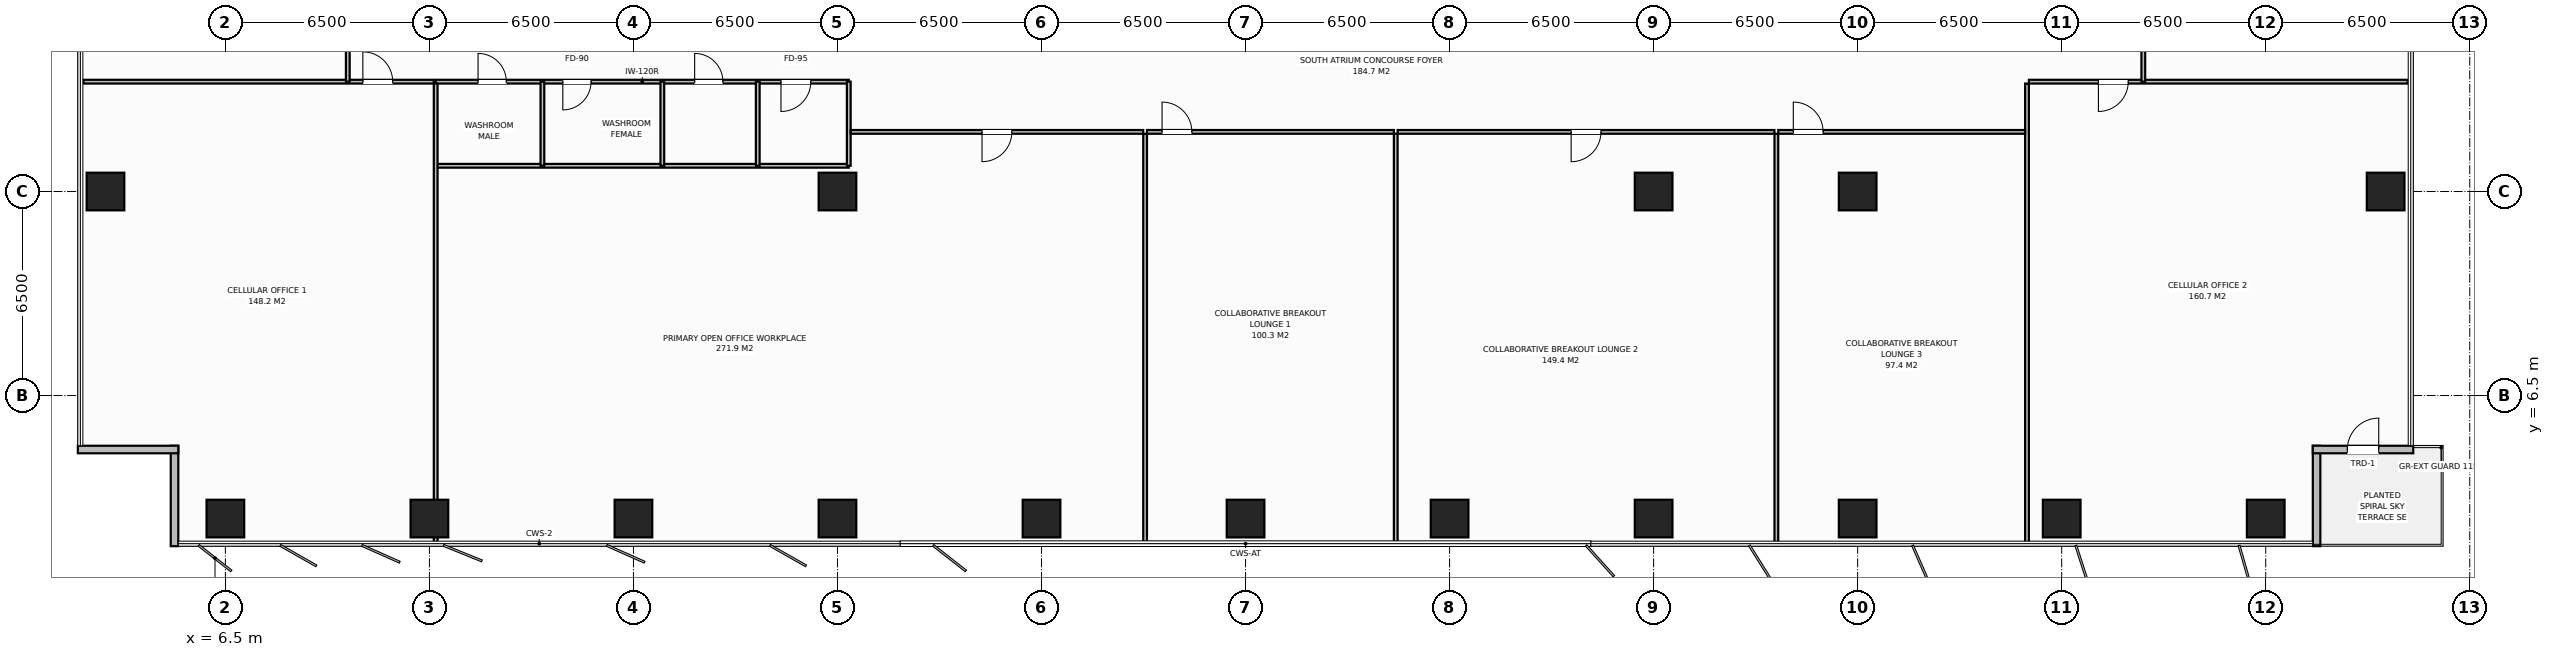
"""IFC4 building model, lengths in metres.
Left out: names, types, materials, properties, quantities, classifications, styles, units other than length and angle.
Written with IfcOpenShell. Run it as: python <this file> out.ifc"""

import sys

from ifc_helpers import new_model, si_unit, direction, frame, frame_2d, origin, origin_2d, place, context, subcontext, project, spatial, rectangle, extrude, element, fill, save


model = new_model("IFC4")
c1 = context("Model", 3, precision=1e-05, world=origin(), true_north=direction((0.0, 1.0)))
c2 = subcontext(c1, "Body", "Model", "MODEL_VIEW")
j1 = project(units=[si_unit("LENGTHUNIT", "METRE"), si_unit("PLANEANGLEUNIT", "RADIAN")], contexts=[c1])
p1 = place(None, origin())
s1 = spatial("IfcSite", under=j1, at=p1, CompositionType="ELEMENT")
p2 = place(p1, origin())
s2 = spatial("IfcBuilding", under=s1, at=p2, CompositionType="ELEMENT")
p3 = place(p2, frame((0.0, 0.0, 116.4)))
s3 = spatial("IfcBuildingStorey", under=s2, at=p3, CompositionType="ELEMENT", Elevation=116.4)
for number, where, z_axis, x_axis in (
    (1, (58.5, 13.0, 0.0), (0.0, 0.0, 1.0), (1.0, 0.0, 0.0)),
    (2, (26.0, 13.0, 0.0), (0.0, 0.0, 1.0), (1.0, 0.0, 0.0)),
    (3, (52.0, 13.0, 0.0), (0.0, 0.0, 1.0), (1.0, 0.0, 0.0)),
    (4, (6.5, 2.58, 0.0), (0.0, 0.0, 1.0), (1.0, 0.0, 0.0)),
    (5, (13.0, 2.58, 0.0), (0.0, 0.0, 1.0), (1.0, 0.0, 0.0)),
    (6, (19.5, 2.58, 0.0), (0.0, 0.0, 1.0), (1.0, 0.0, 0.0)),
    (7, (26.0, 2.58, 0.0), (0.0, 0.0, 1.0), (1.0, 0.0, 0.0)),
    (8, (32.5, 2.58, 0.0), (0.0, 0.0, 1.0), (1.0, 0.0, 0.0)),
    (9, (39.0, 2.58, 0.0), (0.0, 0.0, 1.0), (1.0, 0.0, 0.0)),
    (10, (45.5, 2.58, 0.0), (0.0, 0.0, 1.0), (1.0, 0.0, 0.0)),
    (11, (52.0, 2.58, 0.0), (0.0, 0.0, 1.0), (1.0, 0.0, 0.0)),
    (12, (58.5, 2.58, 0.0), (0.0, 0.0, 1.0), (1.0, 0.0, 0.0)),
    (13, (65.0, 2.58, 0.0), (0.0, 0.0, 1.0), (1.0, 0.0, 0.0)),
    (14, (71.5, 2.58, 0.0), (0.0, 0.0, 1.0), (1.0, 0.0, 0.0)),
    (15, (2.68, 13.0, 0.0), (0.0, 0.0, 1.0), (1.0, 0.0, 0.0)),
    (16, (75.32, 13.0, 0.0), (0.0, 0.0, 1.0), (1.0, 0.0, 0.0)),
):
    element("IfcColumn", number, at=place(p3, frame(where, z_axis=z_axis, x_axis=x_axis)), inside=s3, PredefinedType="COLUMN", context=c2, shape_type="SweptSolid", body=[
        extrude(rectangle(XDim=1.2, YDim=1.2, at=origin_2d()), origin(), (0.0, 0.0, 1.0), 3.8),
    ])
for number, where, z_axis, x_axis in (
    (17, (4.88, 1.7, 0.0), (0.0, 0.0, 1.0), (0.0, 1.0, 0.0)),
    (18, (5.0, 4.78, 0.0), (0.0, 0.0, 1.0), (-1.0, 0.0, 0.0)),
    (19, (73.12, 4.9, 0.0), (0.0, 0.0, 1.0), (0.0, -1.0, 0.0)),
):
    element("IfcWall", number, at=place(p3, frame(where, z_axis=z_axis, x_axis=x_axis)), inside=s3, PredefinedType="STANDARD", context=c2, shape_type="SweptSolid", body=[
        extrude(rectangle(XDim=3.2, YDim=0.24, at=frame_2d((1.6, 0.0))), origin(), (0.0, 0.0, 1.0), 3.565),
    ])
p4 = place(p3, frame((76.2, 4.78, 0.0), z_axis=(0.0, 0.0, 1.0), x_axis=(-1.0, 0.0, 0.0)))
e20 = element("IfcWall", 20, at=p4, inside=s3, PredefinedType="STANDARD", context=c2, shape_type="SweptSolid", body=[
    extrude(rectangle(XDim=3.2, YDim=0.24, at=frame_2d((1.6, 0.0))), origin(), (0.0, 0.0, 1.0), 3.565),
])
p5 = place(p4, frame((1.1, 0.0, 0.0)))
e21 = element("IfcOpeningElement", 21, at=p5, cuts=e20, PredefinedType="OPENING", context=c2, shape_type="SweptSolid", body=[
    extrude(rectangle(XDim=1.0, YDim=2.2, at=frame_2d((0.5, 1.1))), frame((0.0, 0.13, 0.0), z_axis=(0.0, -1.0, 0.0), x_axis=(1.0, 0.0, 0.0)), (0.0, 0.0, 1.0), 0.26),
])
p6 = place(p3, frame((13.2, 16.5, 0.0), z_axis=(0.0, 0.0, 1.0), x_axis=(1.0, 0.0, 0.0)))
e22 = element("IfcWall", 22, at=p6, inside=s3, PredefinedType="PARTITIONING", context=c2, shape_type="SweptSolid", body=[
    extrude(rectangle(XDim=13.16, YDim=0.12, at=frame_2d((6.58, 0.0))), origin(), (0.0, 0.0, 1.0), 3.565),
])
p7 = place(p6, frame((1.35, 0.0, 0.0)))
e23 = element("IfcOpeningElement", 23, at=p7, cuts=e22, PredefinedType="OPENING", context=c2, shape_type="SweptSolid", body=[
    extrude(rectangle(XDim=0.9, YDim=2.15, at=frame_2d((0.45, 1.075))), frame((0.0, 0.07, 0.0), z_axis=(0.0, -1.0, 0.0), x_axis=(1.0, 0.0, 0.0)), (0.0, 0.0, 1.0), 0.14),
])
p8 = place(p6, frame((4.05, 0.0, 0.0)))
e24 = element("IfcOpeningElement", 24, at=p8, cuts=e22, PredefinedType="OPENING", context=c2, shape_type="SweptSolid", body=[
    extrude(rectangle(XDim=0.9, YDim=2.15, at=frame_2d((0.45, 1.075))), frame((0.0, 0.07, 0.0), z_axis=(0.0, -1.0, 0.0), x_axis=(1.0, 0.0, 0.0)), (0.0, 0.0, 1.0), 0.14),
])
p9 = place(p6, frame((8.25, 0.0, 0.0)))
e25 = element("IfcOpeningElement", 25, at=p9, cuts=e22, PredefinedType="OPENING", context=c2, shape_type="SweptSolid", body=[
    extrude(rectangle(XDim=0.9, YDim=2.15, at=frame_2d((0.45, 1.075))), frame((0.0, 0.07, 0.0), z_axis=(0.0, -1.0, 0.0), x_axis=(1.0, 0.0, 0.0)), (0.0, 0.0, 1.0), 0.14),
])
p10 = place(p6, frame((11.0, 0.0, 0.0)))
e26 = element("IfcOpeningElement", 26, at=p10, cuts=e22, PredefinedType="OPENING", context=c2, shape_type="SweptSolid", body=[
    extrude(rectangle(XDim=0.95, YDim=2.15, at=frame_2d((0.475, 1.075))), frame((0.0, 0.07, 0.0), z_axis=(0.0, -1.0, 0.0), x_axis=(1.0, 0.0, 0.0)), (0.0, 0.0, 1.0), 0.14),
])
p11 = place(p3, frame((13.2, 13.82, 0.0), z_axis=(0.0, 0.0, 1.0), x_axis=(1.0, 0.0, 0.0)))
e27 = element("IfcWall", 27, at=p11, inside=s3, PredefinedType="PARTITIONING", context=c2, shape_type="SweptSolid", body=[
    extrude(rectangle(XDim=13.16, YDim=0.12, at=frame_2d((6.58, 0.0))), origin(), (0.0, 0.0, 1.0), 3.565),
])
for number, where, z_axis, x_axis in (
    (28, (16.6, 13.82, 0.0), (0.0, 0.0, 1.0), (0.0, 1.0, 0.0)),
    (29, (20.42, 13.82, 0.0), (0.0, 0.0, 1.0), (0.0, 1.0, 0.0)),
    (30, (23.46, 13.82, 0.0), (0.0, 0.0, 1.0), (0.0, 1.0, 0.0)),
    (31, (26.36, 13.82, 0.0), (0.0, 0.0, 1.0), (0.0, 1.0, 0.0)),
):
    element("IfcWall", number, at=place(p3, frame(where, z_axis=z_axis, x_axis=x_axis)), inside=s3, PredefinedType="PARTITIONING", context=c2, shape_type="SweptSolid", body=[
        extrude(rectangle(XDim=2.68, YDim=0.12, at=frame_2d((1.34, 0.0))), origin(), (0.0, 0.0, 1.0), 3.565),
    ])
p12 = place(p3, frame((13.2, 1.72, 0.0), z_axis=(0.0, 0.0, 1.0), x_axis=(0.0, 1.0, 0.0)))
e32 = element("IfcWall", 32, at=p12, inside=s3, PredefinedType="PARTITIONING", context=c2, shape_type="SweptSolid", body=[
    extrude(rectangle(XDim=14.72, YDim=0.12, at=frame_2d((7.36, 0.0))), origin(), (0.0, 0.0, 1.0), 2.965),
])
p13 = place(p3, frame((1.98, 16.5, 0.0), z_axis=(0.0, 0.0, 1.0), x_axis=(1.0, 0.0, 0.0)))
e33 = element("IfcWall", 33, at=p13, inside=s3, PredefinedType="PARTITIONING", context=c2, shape_type="SweptSolid", body=[
    extrude(rectangle(XDim=11.16, YDim=0.12, at=frame_2d((5.58, 0.0))), origin(), (0.0, 0.0, 1.0), 3.565),
])
p14 = place(p13, frame((8.9, 0.0, 0.0)))
e34 = element("IfcOpeningElement", 34, at=p14, cuts=e33, PredefinedType="OPENING", context=c2, shape_type="SweptSolid", body=[
    extrude(rectangle(XDim=0.95, YDim=2.15, at=frame_2d((0.475, 1.075))), frame((0.0, 0.07, 0.0), z_axis=(0.0, -1.0, 0.0), x_axis=(1.0, 0.0, 0.0)), (0.0, 0.0, 1.0), 0.14),
])
p15 = place(p3, frame((35.8, 1.72, 0.0), z_axis=(0.0, 0.0, 1.0), x_axis=(0.0, 1.0, 0.0)))
e35 = element("IfcWall", 35, at=p15, inside=s3, PredefinedType="PARTITIONING", context=c2, shape_type="SweptSolid", body=[
    extrude(rectangle(XDim=13.12, YDim=0.12, at=frame_2d((6.56, 0.0))), origin(), (0.0, 0.0, 1.0), 3.565),
])
p16 = place(p3, frame((26.42, 14.9, 0.0), z_axis=(0.0, 0.0, 1.0), x_axis=(1.0, 0.0, 0.0)))
e36 = element("IfcWall", 36, at=p16, inside=s3, PredefinedType="PARTITIONING", context=c2, shape_type="SweptSolid", body=[
    extrude(rectangle(XDim=9.32, YDim=0.12, at=frame_2d((4.66, 0.0))), origin(), (0.0, 0.0, 1.0), 3.565),
])
p17 = place(p16, frame((4.185, 0.0, 0.0)))
e37 = element("IfcOpeningElement", 37, at=p17, cuts=e36, PredefinedType="OPENING", context=c2, shape_type="SweptSolid", body=[
    extrude(rectangle(XDim=0.95, YDim=2.15, at=frame_2d((0.475, 1.075))), frame((0.0, 0.07, 0.0), z_axis=(0.0, -1.0, 0.0), x_axis=(1.0, 0.0, 0.0)), (0.0, 0.0, 1.0), 0.14),
])
p18 = place(p3, frame((43.785, 1.72, 0.0), z_axis=(0.0, 0.0, 1.0), x_axis=(0.0, 1.0, 0.0)))
e38 = element("IfcWall", 38, at=p18, inside=s3, PredefinedType="PARTITIONING", context=c2, shape_type="SweptSolid", body=[
    extrude(rectangle(XDim=13.12, YDim=0.12, at=frame_2d((6.56, 0.0))), origin(), (0.0, 0.0, 1.0), 3.565),
])
p19 = place(p3, frame((35.86, 14.9, 0.0), z_axis=(0.0, 0.0, 1.0), x_axis=(1.0, 0.0, 0.0)))
e39 = element("IfcWall", 39, at=p19, inside=s3, PredefinedType="PARTITIONING", context=c2, shape_type="SweptSolid", body=[
    extrude(rectangle(XDim=7.865, YDim=0.12, at=frame_2d((3.932, 0.0))), origin(), (0.0, 0.0, 1.0), 3.565),
])
p20 = place(p19, frame((0.48, 0.0, 0.0)))
e40 = element("IfcOpeningElement", 40, at=p20, cuts=e39, PredefinedType="OPENING", context=c2, shape_type="SweptSolid", body=[
    extrude(rectangle(XDim=0.95, YDim=2.15, at=frame_2d((0.475, 1.075))), frame((0.0, 0.07, 0.0), z_axis=(0.0, -1.0, 0.0), x_axis=(1.0, 0.0, 0.0)), (0.0, 0.0, 1.0), 0.14),
])
p21 = place(p3, frame((55.91, 1.72, 0.0), z_axis=(0.0, 0.0, 1.0), x_axis=(0.0, 1.0, 0.0)))
e41 = element("IfcWall", 41, at=p21, inside=s3, PredefinedType="PARTITIONING", context=c2, shape_type="SweptSolid", body=[
    extrude(rectangle(XDim=13.12, YDim=0.12, at=frame_2d((6.56, 0.0))), origin(), (0.0, 0.0, 1.0), 3.565),
])
p22 = place(p3, frame((43.845, 14.9, 0.0), z_axis=(0.0, 0.0, 1.0), x_axis=(1.0, 0.0, 0.0)))
e42 = element("IfcWall", 42, at=p22, inside=s3, PredefinedType="PARTITIONING", context=c2, shape_type="SweptSolid", body=[
    extrude(rectangle(XDim=12.005, YDim=0.12, at=frame_2d((6.002, 0.0))), origin(), (0.0, 0.0, 1.0), 3.565),
])
p23 = place(p22, frame((5.528, 0.0, 0.0)))
e43 = element("IfcOpeningElement", 43, at=p23, cuts=e42, PredefinedType="OPENING", context=c2, shape_type="SweptSolid", body=[
    extrude(rectangle(XDim=0.95, YDim=2.15, at=frame_2d((0.475, 1.075))), frame((0.0, 0.07, 0.0), z_axis=(0.0, -1.0, 0.0), x_axis=(1.0, 0.0, 0.0)), (0.0, 0.0, 1.0), 0.14),
])
p24 = place(p3, frame((63.895, 1.72, 0.0), z_axis=(0.0, 0.0, 1.0), x_axis=(0.0, 1.0, 0.0)))
e44 = element("IfcWall", 44, at=p24, inside=s3, PredefinedType="PARTITIONING", context=c2, shape_type="SweptSolid", body=[
    extrude(rectangle(XDim=14.72, YDim=0.12, at=frame_2d((7.36, 0.0))), origin(), (0.0, 0.0, 1.0), 3.565),
])
p25 = place(p3, frame((55.97, 14.9, 0.0), z_axis=(0.0, 0.0, 1.0), x_axis=(1.0, 0.0, 0.0)))
e45 = element("IfcWall", 45, at=p25, inside=s3, PredefinedType="PARTITIONING", context=c2, shape_type="SweptSolid", body=[
    extrude(rectangle(XDim=7.865, YDim=0.12, at=frame_2d((3.933, 0.0))), origin(), (0.0, 0.0, 1.0), 3.565),
])
p26 = place(p25, frame((0.48, 0.0, 0.0)))
e46 = element("IfcOpeningElement", 46, at=p26, cuts=e45, PredefinedType="OPENING", context=c2, shape_type="SweptSolid", body=[
    extrude(rectangle(XDim=0.95, YDim=2.15, at=frame_2d((0.475, 1.075))), frame((0.0, 0.07, 0.0), z_axis=(0.0, -1.0, 0.0), x_axis=(1.0, 0.0, 0.0)), (0.0, 0.0, 1.0), 0.14),
])
p27 = place(p3, frame((63.955, 16.5, 0.0), z_axis=(0.0, 0.0, 1.0), x_axis=(1.0, 0.0, 0.0)))
e47 = element("IfcWall", 47, at=p27, inside=s3, PredefinedType="PARTITIONING", context=c2, shape_type="SweptSolid", body=[
    extrude(rectangle(XDim=12.065, YDim=0.12, at=frame_2d((6.033, 0.0))), origin(), (0.0, 0.0, 1.0), 3.565),
])
p28 = place(p27, frame((2.215, 0.0, 0.0)))
e48 = element("IfcOpeningElement", 48, at=p28, cuts=e47, PredefinedType="OPENING", context=c2, shape_type="SweptSolid", body=[
    extrude(rectangle(XDim=0.95, YDim=2.15, at=frame_2d((0.475, 1.075))), frame((0.0, 0.07, 0.0), z_axis=(0.0, -1.0, 0.0), x_axis=(1.0, 0.0, 0.0)), (0.0, 0.0, 1.0), 0.14),
])
p29 = place(p3, frame((10.4, 16.5, 0.0), z_axis=(0.0, 0.0, 1.0), x_axis=(0.0, 1.0, 0.0)))
e49 = element("IfcWall", 49, at=p29, inside=s3, PredefinedType="PARTITIONING", context=c2, shape_type="SweptSolid", body=[
    extrude(rectangle(XDim=6.333, YDim=0.12, at=frame_2d((3.167, 0.0))), origin(), (0.0, 0.0, 1.0), 3.565),
])
p30 = place(p29, frame((3.742, 0.0, 0.0)))
e50 = element("IfcOpeningElement", 50, at=p30, cuts=e49, PredefinedType="OPENING", context=c2, shape_type="SweptSolid", body=[
    extrude(rectangle(XDim=0.95, YDim=2.15, at=frame_2d((0.475, 1.075))), frame((0.0, 0.07, 0.0), z_axis=(0.0, -1.0, 0.0), x_axis=(1.0, 0.0, 0.0)), (0.0, 0.0, 1.0), 0.14),
])
p31 = place(p3, frame((67.6, 16.5, 0.0), z_axis=(0.0, 0.0, 1.0), x_axis=(0.0, 1.0, 0.0)))
e51 = element("IfcWall", 51, at=p31, inside=s3, PredefinedType="PARTITIONING", context=c2, shape_type="SweptSolid", body=[
    extrude(rectangle(XDim=19.0, YDim=0.12, at=frame_2d((9.5, 0.0))), origin(), (0.0, 0.0, 1.0), 3.565),
])
p32 = place(p31, frame((9.025, 0.0, 0.0)))
e52 = element("IfcOpeningElement", 52, at=p32, cuts=e51, PredefinedType="OPENING", context=c2, shape_type="SweptSolid", body=[
    extrude(rectangle(XDim=0.95, YDim=2.15, at=frame_2d((0.475, 1.075))), frame((0.0, 0.07, 0.0), z_axis=(0.0, -1.0, 0.0), x_axis=(1.0, 0.0, 0.0)), (0.0, 0.0, 1.0), 0.14),
])
p33 = place(p5, origin())
e53 = element("IfcDoor", 53, at=p33, inside=s3, OperationType="SINGLE_SWING_RIGHT", PredefinedType="DOOR", context=c2, shape_type="SweptSolid", body=[
    extrude(rectangle(XDim=1.0, YDim=2.2, at=frame_2d((0.5, 1.1))), frame((0.0, 0.025, 0.0), z_axis=(0.0, -1.0, 0.0), x_axis=(1.0, 0.0, 0.0)), (0.0, 0.0, 1.0), 0.05),
])
fill(e21, e53)
p34 = place(p7, origin())
e54 = element("IfcDoor", 54, at=p34, inside=s3, OperationType="SINGLE_SWING_LEFT", PredefinedType="DOOR", context=c2, shape_type="SweptSolid", body=[
    extrude(rectangle(XDim=0.9, YDim=2.15, at=frame_2d((0.45, 1.075))), frame((0.0, 0.025, 0.0), z_axis=(0.0, -1.0, 0.0), x_axis=(1.0, 0.0, 0.0)), (0.0, 0.0, 1.0), 0.05),
])
fill(e23, e54)
p35 = place(p8, origin())
e55 = element("IfcDoor", 55, at=p35, inside=s3, OperationType="SINGLE_SWING_RIGHT", PredefinedType="DOOR", context=c2, shape_type="SweptSolid", body=[
    extrude(rectangle(XDim=0.9, YDim=2.15, at=frame_2d((0.45, 1.075))), frame((0.0, 0.025, 0.0), z_axis=(0.0, -1.0, 0.0), x_axis=(1.0, 0.0, 0.0)), (0.0, 0.0, 1.0), 0.05),
])
fill(e24, e55)
p36 = place(p9, origin())
e56 = element("IfcDoor", 56, at=p36, inside=s3, OperationType="SINGLE_SWING_LEFT", PredefinedType="DOOR", context=c2, shape_type="SweptSolid", body=[
    extrude(rectangle(XDim=0.9, YDim=2.15, at=frame_2d((0.45, 1.075))), frame((0.0, 0.025, 0.0), z_axis=(0.0, -1.0, 0.0), x_axis=(1.0, 0.0, 0.0)), (0.0, 0.0, 1.0), 0.05),
])
fill(e25, e56)
p37 = place(p10, origin())
e57 = element("IfcDoor", 57, at=p37, inside=s3, OperationType="SINGLE_SWING_RIGHT", PredefinedType="DOOR", context=c2, shape_type="SweptSolid", body=[
    extrude(rectangle(XDim=0.95, YDim=2.15, at=frame_2d((0.475, 1.075))), frame((0.0, 0.025, 0.0), z_axis=(0.0, -1.0, 0.0), x_axis=(1.0, 0.0, 0.0)), (0.0, 0.0, 1.0), 0.05),
])
fill(e26, e57)
p38 = place(p14, origin())
e58 = element("IfcDoor", 58, at=p38, inside=s3, OperationType="SINGLE_SWING_LEFT", PredefinedType="DOOR", context=c2, shape_type="SweptSolid", body=[
    extrude(rectangle(XDim=0.95, YDim=2.15, at=frame_2d((0.475, 1.075))), frame((0.0, 0.025, 0.0), z_axis=(0.0, -1.0, 0.0), x_axis=(1.0, 0.0, 0.0)), (0.0, 0.0, 1.0), 0.05),
])
fill(e34, e58)
p39 = place(p17, origin())
e59 = element("IfcDoor", 59, at=p39, inside=s3, OperationType="SINGLE_SWING_RIGHT", PredefinedType="DOOR", context=c2, shape_type="SweptSolid", body=[
    extrude(rectangle(XDim=0.95, YDim=2.15, at=frame_2d((0.475, 1.075))), frame((0.0, 0.025, 0.0), z_axis=(0.0, -1.0, 0.0), x_axis=(1.0, 0.0, 0.0)), (0.0, 0.0, 1.0), 0.05),
])
fill(e37, e59)
p40 = place(p20, origin())
e60 = element("IfcDoor", 60, at=p40, inside=s3, OperationType="SINGLE_SWING_LEFT", PredefinedType="DOOR", context=c2, shape_type="SweptSolid", body=[
    extrude(rectangle(XDim=0.95, YDim=2.15, at=frame_2d((0.475, 1.075))), frame((0.0, 0.025, 0.0), z_axis=(0.0, -1.0, 0.0), x_axis=(1.0, 0.0, 0.0)), (0.0, 0.0, 1.0), 0.05),
])
fill(e40, e60)
p41 = place(p23, origin())
e61 = element("IfcDoor", 61, at=p41, inside=s3, OperationType="SINGLE_SWING_RIGHT", PredefinedType="DOOR", context=c2, shape_type="SweptSolid", body=[
    extrude(rectangle(XDim=0.95, YDim=2.15, at=frame_2d((0.475, 1.075))), frame((0.0, 0.025, 0.0), z_axis=(0.0, -1.0, 0.0), x_axis=(1.0, 0.0, 0.0)), (0.0, 0.0, 1.0), 0.05),
])
fill(e43, e61)
p42 = place(p26, origin())
e62 = element("IfcDoor", 62, at=p42, inside=s3, OperationType="SINGLE_SWING_LEFT", PredefinedType="DOOR", context=c2, shape_type="SweptSolid", body=[
    extrude(rectangle(XDim=0.95, YDim=2.15, at=frame_2d((0.475, 1.075))), frame((0.0, 0.025, 0.0), z_axis=(0.0, -1.0, 0.0), x_axis=(1.0, 0.0, 0.0)), (0.0, 0.0, 1.0), 0.05),
])
fill(e46, e62)
p43 = place(p28, origin())
e63 = element("IfcDoor", 63, at=p43, inside=s3, OperationType="SINGLE_SWING_RIGHT", PredefinedType="DOOR", context=c2, shape_type="SweptSolid", body=[
    extrude(rectangle(XDim=0.95, YDim=2.15, at=frame_2d((0.475, 1.075))), frame((0.0, 0.025, 0.0), z_axis=(0.0, -1.0, 0.0), x_axis=(1.0, 0.0, 0.0)), (0.0, 0.0, 1.0), 0.05),
])
fill(e48, e63)
save(model, sys.argv[1])
